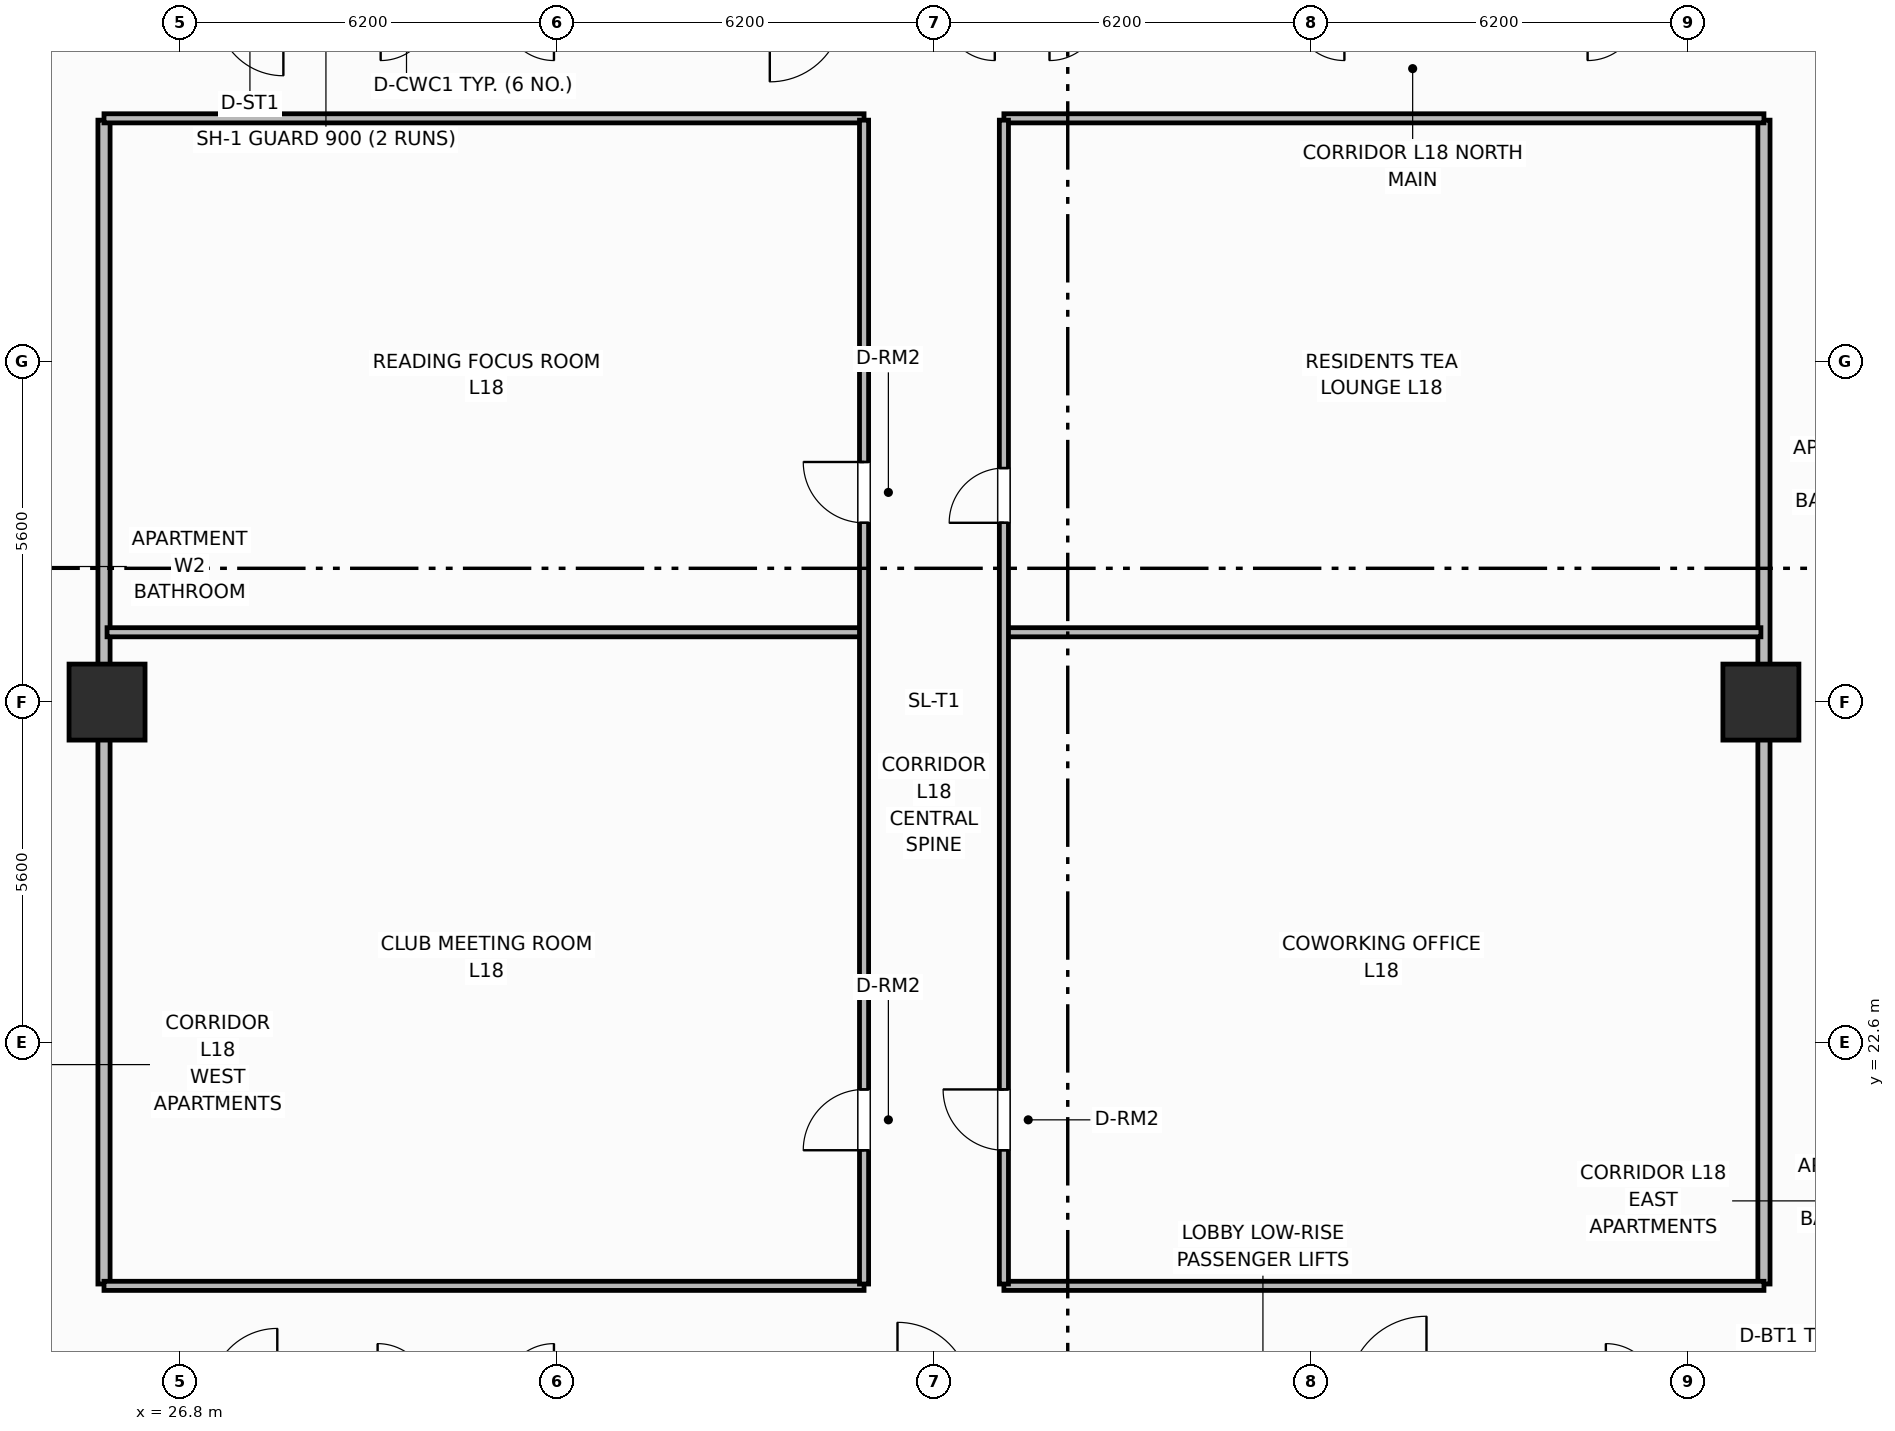
"""IFC4 building model, lengths in metres.
Left out: names, types, materials, properties, quantities, classifications, styles, units other than length and angle.
Written with IfcOpenShell. Run it as: python <this file> out.ifc"""

import sys

from ifc_helpers import new_model, si_unit, direction, frame, frame_2d, origin, origin_2d, place, context, subcontext, project, spatial, rectangle, extrude, element, fill, save


model = new_model("IFC4")
c1 = context("Model", 3, precision=1e-05, world=origin(), true_north=direction((0.0, 1.0)))
c2 = subcontext(c1, "Body", "Model", "MODEL_VIEW")
j1 = project(units=[si_unit("LENGTHUNIT", "METRE"), si_unit("PLANEANGLEUNIT", "RADIAN")], contexts=[c1])
p1 = place(None, origin())
s1 = spatial("IfcSite", under=j1, at=p1, CompositionType="ELEMENT")
p2 = place(p1, origin())
s2 = spatial("IfcBuilding", under=s1, at=p2, CompositionType="ELEMENT")
p3 = place(p2, frame((0.0, 0.0, 73.2)))
s3 = spatial("IfcBuildingStorey", under=s2, at=p3, CompositionType="ELEMENT", Elevation=73.2)
for number, where, z_axis, x_axis in (
    (1, (25.6, 28.2, 0.0), (0.0, 0.0, 1.0), (1.0, 0.0, 0.0)),
    (2, (52.8, 28.2, 0.0), (0.0, 0.0, 1.0), (1.0, 0.0, 0.0)),
):
    element("IfcColumn", number, at=place(p3, frame(where, z_axis=z_axis, x_axis=x_axis)), inside=s3, PredefinedType="COLUMN", context=c2, shape_type="SweptSolid", body=[
        extrude(rectangle(XDim=1.25, YDim=1.25, at=origin_2d()), origin(), (0.0, 0.0, 1.0), 3.7),
    ])
for number, where, z_axis, x_axis in (
    (3, (25.55, 18.63, 0.0), (0.0, 0.0, 1.0), (0.0, 1.0, 0.0)),
    (4, (52.85, 18.63, 0.0), (0.0, 0.0, 1.0), (0.0, 1.0, 0.0)),
):
    element("IfcWall", number, at=place(p3, frame(where, z_axis=z_axis, x_axis=x_axis)), inside=s3, PredefinedType="PARTITIONING", context=c2, shape_type="SweptSolid", body=[
        extrude(rectangle(XDim=19.14, YDim=0.2, at=frame_2d((9.57, 0.0))), origin(), (0.0, 0.0, 1.0), 2.49),
    ])
for number, where, z_axis, x_axis in (
    (5, (25.55, 18.6, 0.0), (0.0, 0.0, 1.0), (1.0, 0.0, 0.0)),
    (6, (40.35, 18.6, 0.0), (0.0, 0.0, 1.0), (1.0, 0.0, 0.0)),
    (7, (25.55, 37.8, 0.0), (0.0, 0.0, 1.0), (1.0, 0.0, 0.0)),
    (8, (40.35, 37.8, 0.0), (0.0, 0.0, 1.0), (1.0, 0.0, 0.0)),
):
    element("IfcWall", number, at=place(p3, frame(where, z_axis=z_axis, x_axis=x_axis)), inside=s3, PredefinedType="PARTITIONING", context=c2, shape_type="SweptSolid", body=[
        extrude(rectangle(XDim=12.5, YDim=0.15, at=frame_2d((6.25, 0.0))), origin(), (0.0, 0.0, 1.0), 2.49),
    ])
p4 = place(p3, frame((25.6, 29.348, 0.0), z_axis=(0.0, 0.0, 1.0), x_axis=(1.0, 0.0, 0.0)))
e9 = element("IfcWall", 9, at=p4, inside=s3, PredefinedType="PARTITIONING", context=c2, shape_type="SweptSolid", body=[
    extrude(rectangle(XDim=12.47, YDim=0.15, at=frame_2d((6.235, 0.0))), origin(), (0.0, 0.0, 1.0), 2.49),
])
p5 = place(p3, frame((40.38, 29.348, 0.0), z_axis=(0.0, 0.0, 1.0), x_axis=(1.0, 0.0, 0.0)))
e10 = element("IfcWall", 10, at=p5, inside=s3, PredefinedType="PARTITIONING", context=c2, shape_type="SweptSolid", body=[
    extrude(rectangle(XDim=12.42, YDim=0.15, at=frame_2d((6.21, 0.0))), origin(), (0.0, 0.0, 1.0), 2.49),
])
p6 = place(p3, frame((38.05, 18.63, 0.0), z_axis=(0.0, 0.0, 1.0), x_axis=(0.0, 1.0, 0.0)))
e11 = element("IfcWall", 11, at=p6, inside=s3, PredefinedType="PARTITIONING", context=c2, shape_type="SweptSolid", body=[
    extrude(rectangle(XDim=19.14, YDim=0.15, at=frame_2d((9.57, 0.0))), origin(), (0.0, 0.0, 1.0), 2.49),
])
p7 = place(p6, frame((2.2, 0.0, 0.0)))
e12 = element("IfcOpeningElement", 12, at=p7, cuts=e11, PredefinedType="OPENING", context=c2, shape_type="SweptSolid", body=[
    extrude(rectangle(XDim=1.0, YDim=2.15, at=frame_2d((0.5, 1.075))), frame((0.0, 0.085, 0.0), z_axis=(0.0, -1.0, 0.0), x_axis=(1.0, 0.0, 0.0)), (0.0, 0.0, 1.0), 0.17),
])
p8 = place(p6, frame((12.518, 0.0, 0.0)))
e13 = element("IfcOpeningElement", 13, at=p8, cuts=e11, PredefinedType="OPENING", context=c2, shape_type="SweptSolid", body=[
    extrude(rectangle(XDim=1.0, YDim=2.15, at=frame_2d((0.5, 1.075))), frame((0.0, 0.085, 0.0), z_axis=(0.0, -1.0, 0.0), x_axis=(1.0, 0.0, 0.0)), (0.0, 0.0, 1.0), 0.17),
])
p9 = place(p3, frame((40.35, 18.63, 0.0), z_axis=(0.0, 0.0, 1.0), x_axis=(0.0, 1.0, 0.0)))
e14 = element("IfcWall", 14, at=p9, inside=s3, PredefinedType="PARTITIONING", context=c2, shape_type="SweptSolid", body=[
    extrude(rectangle(XDim=19.14, YDim=0.15, at=frame_2d((9.57, 0.0))), origin(), (0.0, 0.0, 1.0), 2.49),
])
p10 = place(p9, frame((2.2, 0.0, 0.0)))
e15 = element("IfcOpeningElement", 15, at=p10, cuts=e14, PredefinedType="OPENING", context=c2, shape_type="SweptSolid", body=[
    extrude(rectangle(XDim=1.0, YDim=2.15, at=frame_2d((0.5, 1.075))), frame((0.0, 0.085, 0.0), z_axis=(0.0, -1.0, 0.0), x_axis=(1.0, 0.0, 0.0)), (0.0, 0.0, 1.0), 0.17),
])
p11 = place(p9, frame((12.518, 0.0, 0.0)))
e16 = element("IfcOpeningElement", 16, at=p11, cuts=e14, PredefinedType="OPENING", context=c2, shape_type="SweptSolid", body=[
    extrude(rectangle(XDim=0.9, YDim=2.1, at=frame_2d((0.45, 1.05))), frame((0.0, 0.085, 0.0), z_axis=(0.0, -1.0, 0.0), x_axis=(1.0, 0.0, 0.0)), (0.0, 0.0, 1.0), 0.17),
])
p12 = place(p7, origin())
e17 = element("IfcDoor", 17, at=p12, inside=s3, OperationType="SINGLE_SWING_LEFT", PredefinedType="DOOR", context=c2, shape_type="SweptSolid", body=[
    extrude(rectangle(XDim=1.0, YDim=2.15, at=frame_2d((0.5, 1.075))), frame((0.0, 0.025, 0.0), z_axis=(0.0, -1.0, 0.0), x_axis=(1.0, 0.0, 0.0)), (0.0, 0.0, 1.0), 0.05),
])
fill(e12, e17)
p13 = place(p8, origin())
e18 = element("IfcDoor", 18, at=p13, inside=s3, OperationType="SINGLE_SWING_RIGHT", PredefinedType="DOOR", context=c2, shape_type="SweptSolid", body=[
    extrude(rectangle(XDim=1.0, YDim=2.15, at=frame_2d((0.5, 1.075))), frame((0.0, 0.025, 0.0), z_axis=(0.0, -1.0, 0.0), x_axis=(1.0, 0.0, 0.0)), (0.0, 0.0, 1.0), 0.05),
])
fill(e13, e18)
p14 = place(p10, origin())
e19 = element("IfcDoor", 19, at=p14, inside=s3, OperationType="SINGLE_SWING_RIGHT", PredefinedType="DOOR", context=c2, shape_type="SweptSolid", body=[
    extrude(rectangle(XDim=1.0, YDim=2.15, at=frame_2d((0.5, 1.075))), frame((0.0, 0.025, 0.0), z_axis=(0.0, -1.0, 0.0), x_axis=(1.0, 0.0, 0.0)), (0.0, 0.0, 1.0), 0.05),
])
fill(e15, e19)
p15 = place(p11, origin())
e20 = element("IfcDoor", 20, at=p15, inside=s3, OperationType="SINGLE_SWING_LEFT", PredefinedType="DOOR", context=c2, shape_type="SweptSolid", body=[
    extrude(rectangle(XDim=0.9, YDim=2.1, at=frame_2d((0.45, 1.05))), frame((0.0, 0.025, 0.0), z_axis=(0.0, -1.0, 0.0), x_axis=(1.0, 0.0, 0.0)), (0.0, 0.0, 1.0), 0.05),
])
fill(e16, e20)
save(model, sys.argv[1])
